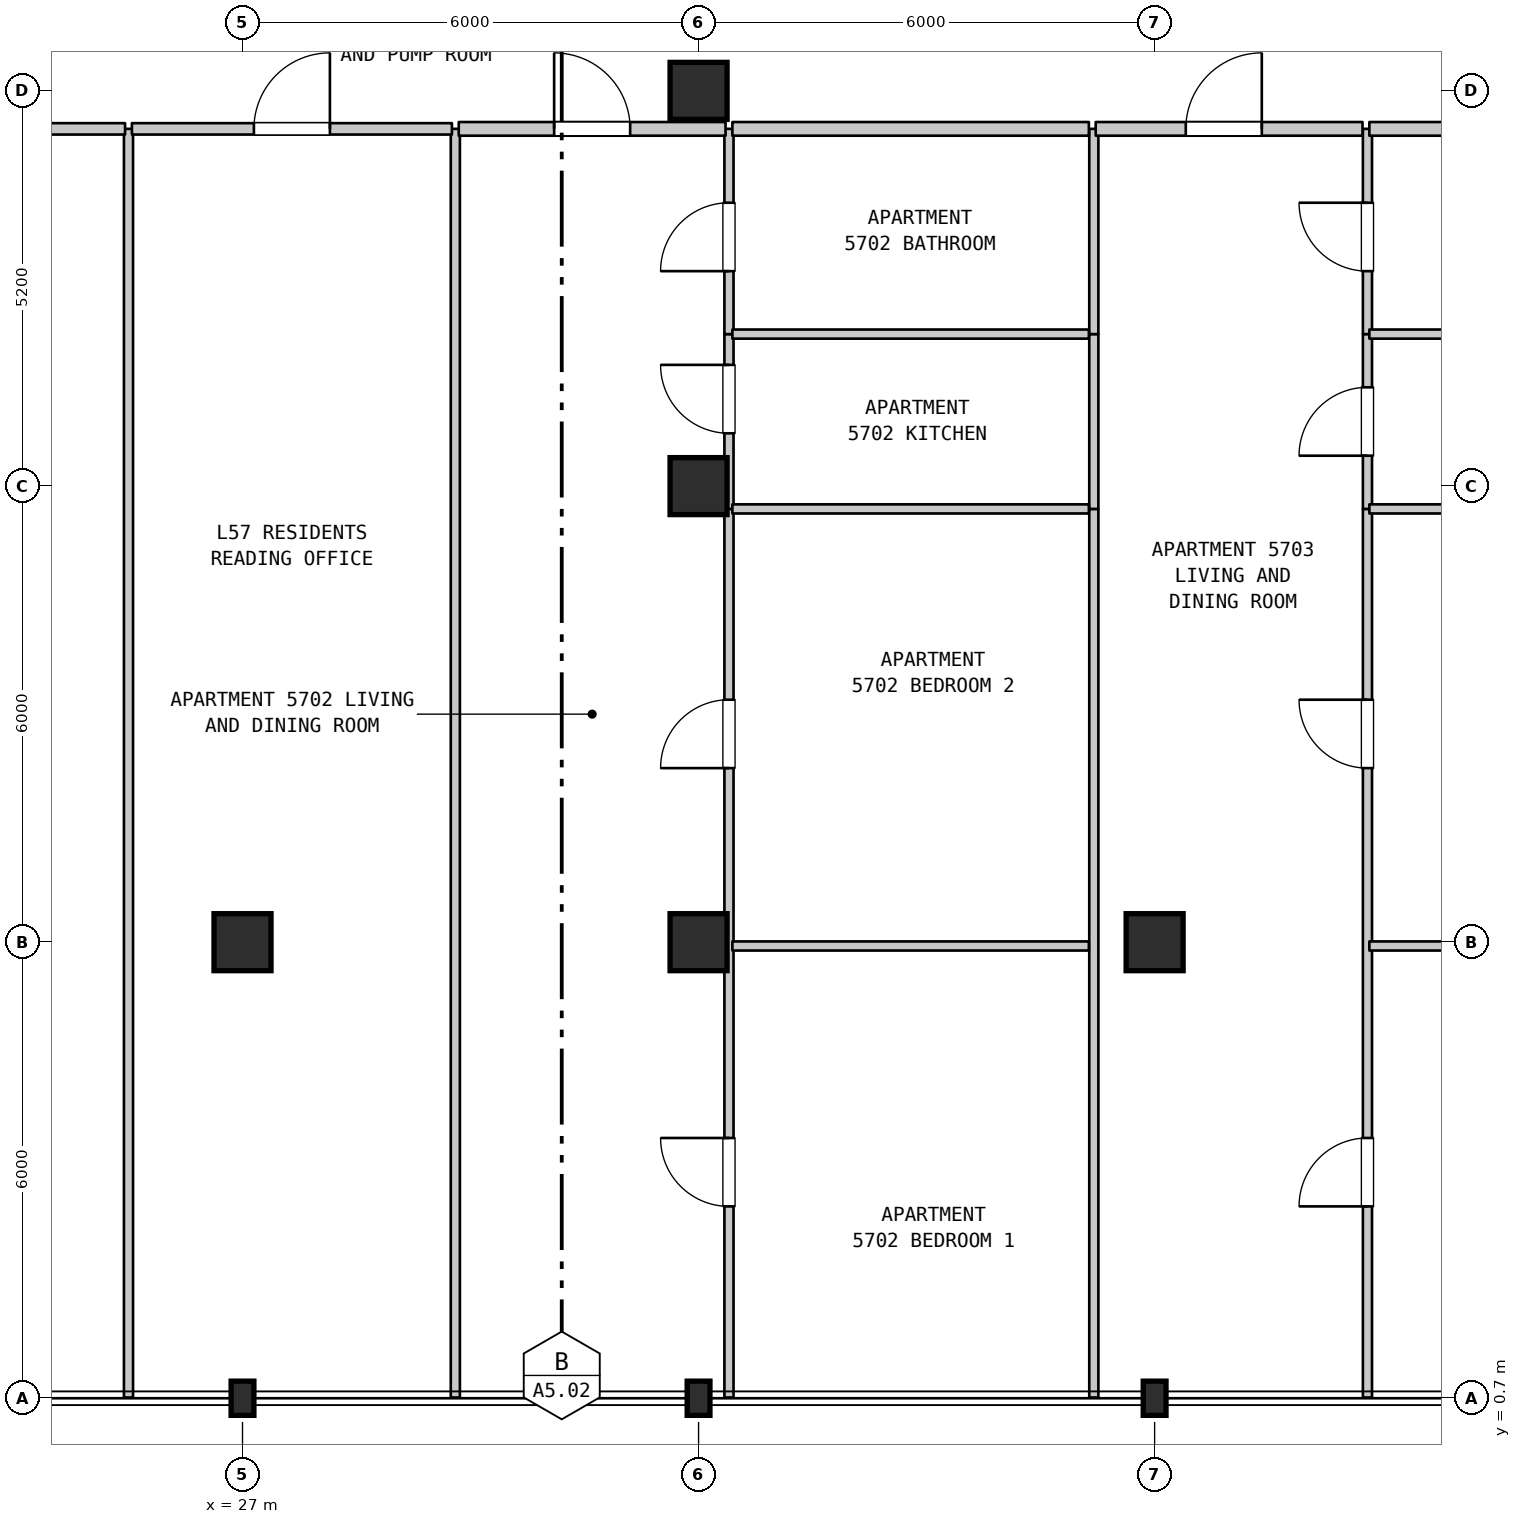
"""IFC4 building model, lengths in metres.
Left out: names, types, materials, properties, quantities, classifications, styles, units other than length and angle.
Written with IfcOpenShell. Run it as: python <this file> out.ifc"""

import sys

from ifc_helpers import new_model, si_unit, direction, frame, frame_2d, origin, origin_2d, place, context, subcontext, project, spatial, rectangle, i_section, extrude, element, fill, save


model = new_model("IFC4")
c1 = context("Model", 3, precision=1e-05, world=origin(), true_north=direction((0.0, 1.0)))
c2 = subcontext(c1, "Body", "Model", "MODEL_VIEW")
j1 = project(units=[si_unit("LENGTHUNIT", "METRE"), si_unit("PLANEANGLEUNIT", "RADIAN")], contexts=[c1])
p1 = place(None, origin())
s1 = spatial("IfcSite", under=j1, at=p1, CompositionType="ELEMENT")
p2 = place(p1, origin())
s2 = spatial("IfcBuilding", under=s1, at=p2, CompositionType="ELEMENT")
p3 = place(p2, frame((0.0, 0.0, 230.2)))
s3 = spatial("IfcBuildingStorey", under=s2, at=p3, CompositionType="ELEMENT", Elevation=230.2)
p4 = place(p3, frame((27.0, 0.7, 0.0), z_axis=(0.0, 0.0, 1.0), x_axis=(1.0, 0.0, 0.0)))
e1 = element("IfcColumn", 1, at=p4, inside=s3, PredefinedType="COLUMN", context=c2, shape_type="SweptSolid", body=[
    extrude(i_section(OverallWidth=0.3, OverallDepth=0.45, WebThickness=0.014, FlangeThickness=0.026, FilletRadius=0.027, at=origin_2d()), origin(), (0.0, 0.0, 1.0), 3.7),
])
p5 = place(p3, frame((27.0, 6.7, 0.0), z_axis=(0.0, 0.0, 1.0), x_axis=(1.0, 0.0, 0.0)))
e2 = element("IfcColumn", 2, at=p5, inside=s3, PredefinedType="COLUMN", context=c2, shape_type="SweptSolid", body=[
    extrude(rectangle(XDim=0.75, YDim=0.75, at=origin_2d()), origin(), (0.0, 0.0, 1.0), 3.7),
])
p6 = place(p3, frame((33.0, 0.7, 0.0), z_axis=(0.0, 0.0, 1.0), x_axis=(1.0, 0.0, 0.0)))
e3 = element("IfcColumn", 3, at=p6, inside=s3, PredefinedType="COLUMN", context=c2, shape_type="SweptSolid", body=[
    extrude(i_section(OverallWidth=0.3, OverallDepth=0.45, WebThickness=0.014, FlangeThickness=0.026, FilletRadius=0.027, at=origin_2d()), origin(), (0.0, 0.0, 1.0), 3.7),
])
for number, where, z_axis, x_axis in (
    (4, (33.0, 6.7, 0.0), (0.0, 0.0, 1.0), (1.0, 0.0, 0.0)),
    (5, (33.0, 12.7, 0.0), (0.0, 0.0, 1.0), (1.0, 0.0, 0.0)),
    (6, (33.0, 17.9, 0.0), (0.0, 0.0, 1.0), (1.0, 0.0, 0.0)),
):
    element("IfcColumn", number, at=place(p3, frame(where, z_axis=z_axis, x_axis=x_axis)), inside=s3, PredefinedType="COLUMN", context=c2, shape_type="SweptSolid", body=[
        extrude(rectangle(XDim=0.75, YDim=0.75, at=origin_2d()), origin(), (0.0, 0.0, 1.0), 3.7),
    ])
p7 = place(p3, frame((39.0, 0.7, 0.0), z_axis=(0.0, 0.0, 1.0), x_axis=(1.0, 0.0, 0.0)))
e7 = element("IfcColumn", 7, at=p7, inside=s3, PredefinedType="COLUMN", context=c2, shape_type="SweptSolid", body=[
    extrude(i_section(OverallWidth=0.3, OverallDepth=0.45, WebThickness=0.014, FlangeThickness=0.026, FilletRadius=0.027, at=origin_2d()), origin(), (0.0, 0.0, 1.0), 3.7),
])
p8 = place(p3, frame((39.0, 6.7, 0.0), z_axis=(0.0, 0.0, 1.0), x_axis=(1.0, 0.0, 0.0)))
e8 = element("IfcColumn", 8, at=p8, inside=s3, PredefinedType="COLUMN", context=c2, shape_type="SweptSolid", body=[
    extrude(rectangle(XDim=0.75, YDim=0.75, at=origin_2d()), origin(), (0.0, 0.0, 1.0), 3.7),
])
for number, where, z_axis, x_axis in (
    (9, (25.5, 0.71, 0.0), (0.0, 0.0, 1.0), (0.0, 1.0, 0.0)),
    (10, (29.8, 0.71, 0.0), (0.0, 0.0, 1.0), (0.0, 1.0, 0.0)),
):
    element("IfcWall", number, at=place(p3, frame(where, z_axis=z_axis, x_axis=x_axis)), inside=s3, PredefinedType="PARTITIONING", context=c2, shape_type="SweptSolid", body=[
        extrude(rectangle(XDim=16.69, YDim=0.12, at=frame_2d((8.345, 0.0))), origin(), (0.0, 0.0, 1.0), 3.39),
    ])
p9 = place(p3, frame((33.4, 0.71, 0.0), z_axis=(0.0, 0.0, 1.0), x_axis=(0.0, 1.0, 0.0)))
e11 = element("IfcWall", 11, at=p9, inside=s3, PredefinedType="PARTITIONING", context=c2, shape_type="SweptSolid", body=[
    extrude(rectangle(XDim=11.69, YDim=0.12, at=frame_2d((5.845, 0.0))), origin(), (0.0, 0.0, 1.0), 3.39),
])
p10 = place(p9, frame((2.514, 0.0, 0.0)))
e12 = element("IfcOpeningElement", 12, at=p10, cuts=e11, PredefinedType="OPENING", context=c2, shape_type="SweptSolid", body=[
    extrude(rectangle(XDim=0.9, YDim=2.15, at=frame_2d((0.45, 1.075))), frame((0.0, 0.07, 0.0), z_axis=(0.0, -1.0, 0.0), x_axis=(1.0, 0.0, 0.0)), (0.0, 0.0, 1.0), 0.14),
])
p11 = place(p9, frame((8.28, 0.0, 0.0)))
e13 = element("IfcOpeningElement", 13, at=p11, cuts=e11, PredefinedType="OPENING", context=c2, shape_type="SweptSolid", body=[
    extrude(rectangle(XDim=0.9, YDim=2.15, at=frame_2d((0.45, 1.075))), frame((0.0, 0.07, 0.0), z_axis=(0.0, -1.0, 0.0), x_axis=(1.0, 0.0, 0.0)), (0.0, 0.0, 1.0), 0.14),
])
p12 = place(p3, frame((33.4, 12.4, 0.0), z_axis=(0.0, 0.0, 1.0), x_axis=(0.0, 1.0, 0.0)))
e14 = element("IfcWall", 14, at=p12, inside=s3, PredefinedType="PARTITIONING", context=c2, shape_type="SweptSolid", body=[
    extrude(rectangle(XDim=2.3, YDim=0.12, at=frame_2d((1.15, 0.0))), origin(), (0.0, 0.0, 1.0), 3.39),
])
p13 = place(p12, frame((0.995, 0.0, 0.0)))
e15 = element("IfcOpeningElement", 15, at=p13, cuts=e14, PredefinedType="OPENING", context=c2, shape_type="SweptSolid", body=[
    extrude(rectangle(XDim=0.9, YDim=2.15, at=frame_2d((0.45, 1.075))), frame((0.0, 0.07, 0.0), z_axis=(0.0, -1.0, 0.0), x_axis=(1.0, 0.0, 0.0)), (0.0, 0.0, 1.0), 0.14),
])
p14 = place(p3, frame((33.4, 14.7, 0.0), z_axis=(0.0, 0.0, 1.0), x_axis=(0.0, 1.0, 0.0)))
e16 = element("IfcWall", 16, at=p14, inside=s3, PredefinedType="PARTITIONING", context=c2, shape_type="SweptSolid", body=[
    extrude(rectangle(XDim=2.7, YDim=0.12, at=frame_2d((1.35, 0.0))), origin(), (0.0, 0.0, 1.0), 3.39),
])
p15 = place(p14, frame((0.828, 0.0, 0.0)))
e17 = element("IfcOpeningElement", 17, at=p15, cuts=e16, PredefinedType="OPENING", context=c2, shape_type="SweptSolid", body=[
    extrude(rectangle(XDim=0.9, YDim=2.1, at=frame_2d((0.45, 1.05))), frame((0.0, 0.07, 0.0), z_axis=(0.0, -1.0, 0.0), x_axis=(1.0, 0.0, 0.0)), (0.0, 0.0, 1.0), 0.14),
])
p16 = place(p3, frame((38.2, 0.71, 0.0), z_axis=(0.0, 0.0, 1.0), x_axis=(0.0, 1.0, 0.0)))
e18 = element("IfcWall", 18, at=p16, inside=s3, PredefinedType="PARTITIONING", context=c2, shape_type="SweptSolid", body=[
    extrude(rectangle(XDim=11.69, YDim=0.12, at=frame_2d((5.845, 0.0))), origin(), (0.0, 0.0, 1.0), 3.39),
])
p17 = place(p3, frame((38.2, 12.4, 0.0), z_axis=(0.0, 0.0, 1.0), x_axis=(0.0, 1.0, 0.0)))
e19 = element("IfcWall", 19, at=p17, inside=s3, PredefinedType="PARTITIONING", context=c2, shape_type="SweptSolid", body=[
    extrude(rectangle(XDim=2.3, YDim=0.12, at=frame_2d((1.15, 0.0))), origin(), (0.0, 0.0, 1.0), 3.39),
])
p18 = place(p3, frame((38.2, 14.7, 0.0), z_axis=(0.0, 0.0, 1.0), x_axis=(0.0, 1.0, 0.0)))
e20 = element("IfcWall", 20, at=p18, inside=s3, PredefinedType="PARTITIONING", context=c2, shape_type="SweptSolid", body=[
    extrude(rectangle(XDim=2.7, YDim=0.12, at=frame_2d((1.35, 0.0))), origin(), (0.0, 0.0, 1.0), 3.39),
])
p19 = place(p3, frame((41.8, 0.71, 0.0), z_axis=(0.0, 0.0, 1.0), x_axis=(0.0, 1.0, 0.0)))
e21 = element("IfcWall", 21, at=p19, inside=s3, PredefinedType="PARTITIONING", context=c2, shape_type="SweptSolid", body=[
    extrude(rectangle(XDim=11.69, YDim=0.12, at=frame_2d((5.845, 0.0))), origin(), (0.0, 0.0, 1.0), 3.39),
])
p20 = place(p19, frame((2.514, 0.0, 0.0)))
e22 = element("IfcOpeningElement", 22, at=p20, cuts=e21, PredefinedType="OPENING", context=c2, shape_type="SweptSolid", body=[
    extrude(rectangle(XDim=0.9, YDim=2.15, at=frame_2d((0.45, 1.075))), frame((0.0, 0.07, 0.0), z_axis=(0.0, -1.0, 0.0), x_axis=(1.0, 0.0, 0.0)), (0.0, 0.0, 1.0), 0.14),
])
p21 = place(p19, frame((8.28, 0.0, 0.0)))
e23 = element("IfcOpeningElement", 23, at=p21, cuts=e21, PredefinedType="OPENING", context=c2, shape_type="SweptSolid", body=[
    extrude(rectangle(XDim=0.9, YDim=2.15, at=frame_2d((0.45, 1.075))), frame((0.0, 0.07, 0.0), z_axis=(0.0, -1.0, 0.0), x_axis=(1.0, 0.0, 0.0)), (0.0, 0.0, 1.0), 0.14),
])
p22 = place(p3, frame((41.8, 12.4, 0.0), z_axis=(0.0, 0.0, 1.0), x_axis=(0.0, 1.0, 0.0)))
e24 = element("IfcWall", 24, at=p22, inside=s3, PredefinedType="PARTITIONING", context=c2, shape_type="SweptSolid", body=[
    extrude(rectangle(XDim=2.3, YDim=0.12, at=frame_2d((1.15, 0.0))), origin(), (0.0, 0.0, 1.0), 3.39),
])
p23 = place(p22, frame((0.7, 0.0, 0.0)))
e25 = element("IfcOpeningElement", 25, at=p23, cuts=e24, PredefinedType="OPENING", context=c2, shape_type="SweptSolid", body=[
    extrude(rectangle(XDim=0.9, YDim=2.15, at=frame_2d((0.45, 1.075))), frame((0.0, 0.07, 0.0), z_axis=(0.0, -1.0, 0.0), x_axis=(1.0, 0.0, 0.0)), (0.0, 0.0, 1.0), 0.14),
])
p24 = place(p3, frame((41.8, 14.7, 0.0), z_axis=(0.0, 0.0, 1.0), x_axis=(0.0, 1.0, 0.0)))
e26 = element("IfcWall", 26, at=p24, inside=s3, PredefinedType="PARTITIONING", context=c2, shape_type="SweptSolid", body=[
    extrude(rectangle(XDim=2.7, YDim=0.12, at=frame_2d((1.35, 0.0))), origin(), (0.0, 0.0, 1.0), 3.39),
])
p25 = place(p24, frame((0.828, 0.0, 0.0)))
e27 = element("IfcOpeningElement", 27, at=p25, cuts=e26, PredefinedType="OPENING", context=c2, shape_type="SweptSolid", body=[
    extrude(rectangle(XDim=0.9, YDim=2.1, at=frame_2d((0.45, 1.05))), frame((0.0, 0.07, 0.0), z_axis=(0.0, -1.0, 0.0), x_axis=(1.0, 0.0, 0.0)), (0.0, 0.0, 1.0), 0.14),
])
p26 = place(p3, frame((33.445, 6.65, 0.0), z_axis=(0.0, 0.0, 1.0), x_axis=(1.0, 0.0, 0.0)))
e28 = element("IfcWall", 28, at=p26, inside=s3, PredefinedType="PARTITIONING", context=c2, shape_type="SweptSolid", body=[
    extrude(rectangle(XDim=4.69, YDim=0.12, at=frame_2d((2.345, 0.0))), origin(), (0.0, 0.0, 1.0), 3.09),
])
p27 = place(p3, frame((41.825, 6.65, 0.0), z_axis=(0.0, 0.0, 1.0), x_axis=(1.0, 0.0, 0.0)))
e29 = element("IfcWall", 29, at=p27, inside=s3, PredefinedType="PARTITIONING", context=c2, shape_type="SweptSolid", body=[
    extrude(rectangle(XDim=4.97, YDim=0.12, at=frame_2d((2.485, 0.0))), origin(), (0.0, 0.0, 1.0), 2.79),
])
p28 = place(p3, frame((33.445, 12.4, 0.0), z_axis=(0.0, 0.0, 1.0), x_axis=(1.0, 0.0, 0.0)))
e30 = element("IfcWall", 30, at=p28, inside=s3, PredefinedType="PARTITIONING", context=c2, shape_type="SweptSolid", body=[
    extrude(rectangle(XDim=4.69, YDim=0.12, at=frame_2d((2.345, 0.0))), origin(), (0.0, 0.0, 1.0), 3.39),
])
p29 = place(p3, frame((41.825, 12.4, 0.0), z_axis=(0.0, 0.0, 1.0), x_axis=(1.0, 0.0, 0.0)))
e31 = element("IfcWall", 31, at=p29, inside=s3, PredefinedType="PARTITIONING", context=c2, shape_type="SweptSolid", body=[
    extrude(rectangle(XDim=4.97, YDim=0.12, at=frame_2d((2.485, 0.0))), origin(), (0.0, 0.0, 1.0), 3.39),
])
p30 = place(p3, frame((33.445, 14.7, 0.0), z_axis=(0.0, 0.0, 1.0), x_axis=(1.0, 0.0, 0.0)))
e32 = element("IfcWall", 32, at=p30, inside=s3, PredefinedType="PARTITIONING", context=c2, shape_type="SweptSolid", body=[
    extrude(rectangle(XDim=4.69, YDim=0.12, at=frame_2d((2.345, 0.0))), origin(), (0.0, 0.0, 1.0), 3.39),
])
p31 = place(p3, frame((41.825, 14.7, 0.0), z_axis=(0.0, 0.0, 1.0), x_axis=(1.0, 0.0, 0.0)))
e33 = element("IfcWall", 33, at=p31, inside=s3, PredefinedType="PARTITIONING", context=c2, shape_type="SweptSolid", body=[
    extrude(rectangle(XDim=4.97, YDim=0.12, at=frame_2d((2.485, 0.0))), origin(), (0.0, 0.0, 1.0), 3.39),
])
p32 = place(p3, frame((20.545, 17.4, 0.0), z_axis=(0.0, 0.0, 1.0), x_axis=(1.0, 0.0, 0.0)))
e34 = element("IfcWall", 34, at=p32, inside=s3, PredefinedType="STANDARD", context=c2, shape_type="SweptSolid", body=[
    extrude(rectangle(XDim=4.91, YDim=0.15, at=frame_2d((2.455, 0.0))), origin(), (0.0, 0.0, 1.0), 3.39),
])
p33 = place(p32, frame((1.884, 0.0, 0.0)))
e35 = element("IfcOpeningElement", 35, at=p33, cuts=e34, PredefinedType="OPENING", context=c2, shape_type="SweptSolid", body=[
    extrude(rectangle(XDim=1.0, YDim=2.15, at=frame_2d((0.5, 1.075))), frame((0.0, 0.085, 0.0), z_axis=(0.0, -1.0, 0.0), x_axis=(1.0, 0.0, 0.0)), (0.0, 0.0, 1.0), 0.17),
])
p34 = place(p3, frame((25.545, 17.4, 0.0), z_axis=(0.0, 0.0, 1.0), x_axis=(1.0, 0.0, 0.0)))
e36 = element("IfcWall", 36, at=p34, inside=s3, PredefinedType="STANDARD", context=c2, shape_type="SweptSolid", body=[
    extrude(rectangle(XDim=4.21, YDim=0.15, at=frame_2d((2.105, 0.0))), origin(), (0.0, 0.0, 1.0), 3.39),
])
p35 = place(p34, frame((1.605, 0.0, 0.0)))
e37 = element("IfcOpeningElement", 37, at=p35, cuts=e36, PredefinedType="OPENING", context=c2, shape_type="SweptSolid", body=[
    extrude(rectangle(XDim=1.0, YDim=2.15, at=frame_2d((0.5, 1.075))), frame((0.0, 0.085, 0.0), z_axis=(0.0, -1.0, 0.0), x_axis=(1.0, 0.0, 0.0)), (0.0, 0.0, 1.0), 0.17),
])
p36 = place(p3, frame((29.845, 17.4, 0.0), z_axis=(0.0, 0.0, 1.0), x_axis=(1.0, 0.0, 0.0)))
e38 = element("IfcWall", 38, at=p36, inside=s3, PredefinedType="STANDARD", context=c2, shape_type="SweptSolid", body=[
    extrude(rectangle(XDim=3.51, YDim=0.18, at=frame_2d((1.755, 0.0))), origin(), (0.0, 0.0, 1.0), 3.39),
])
p37 = place(p36, frame((1.255, 0.0, 0.0)))
e39 = element("IfcOpeningElement", 39, at=p37, cuts=e38, PredefinedType="OPENING", context=c2, shape_type="SweptSolid", body=[
    extrude(rectangle(XDim=1.0, YDim=2.15, at=frame_2d((0.5, 1.075))), frame((0.0, 0.1, 0.0), z_axis=(0.0, -1.0, 0.0), x_axis=(1.0, 0.0, 0.0)), (0.0, 0.0, 1.0), 0.2),
])
p38 = place(p3, frame((33.445, 17.4, 0.0), z_axis=(0.0, 0.0, 1.0), x_axis=(1.0, 0.0, 0.0)))
e40 = element("IfcWall", 40, at=p38, inside=s3, PredefinedType="STANDARD", context=c2, shape_type="SweptSolid", body=[
    extrude(rectangle(XDim=4.69, YDim=0.18, at=frame_2d((2.345, 0.0))), origin(), (0.0, 0.0, 1.0), 3.39),
])
p39 = place(p3, frame((38.225, 17.4, 0.0), z_axis=(0.0, 0.0, 1.0), x_axis=(1.0, 0.0, 0.0)))
e41 = element("IfcWall", 41, at=p39, inside=s3, PredefinedType="STANDARD", context=c2, shape_type="SweptSolid", body=[
    extrude(rectangle(XDim=3.51, YDim=0.18, at=frame_2d((1.755, 0.0))), origin(), (0.0, 0.0, 1.0), 3.39),
])
p40 = place(p39, frame((1.185, 0.0, 0.0)))
e42 = element("IfcOpeningElement", 42, at=p40, cuts=e41, PredefinedType="OPENING", context=c2, shape_type="SweptSolid", body=[
    extrude(rectangle(XDim=1.0, YDim=2.15, at=frame_2d((0.5, 1.075))), frame((0.0, 0.1, 0.0), z_axis=(0.0, -1.0, 0.0), x_axis=(1.0, 0.0, 0.0)), (0.0, 0.0, 1.0), 0.2),
])
p41 = place(p3, frame((41.825, 17.4, 0.0), z_axis=(0.0, 0.0, 1.0), x_axis=(1.0, 0.0, 0.0)))
e43 = element("IfcWall", 43, at=p41, inside=s3, PredefinedType="STANDARD", context=c2, shape_type="SweptSolid", body=[
    extrude(rectangle(XDim=4.97, YDim=0.18, at=frame_2d((2.485, 0.0))), origin(), (0.0, 0.0, 1.0), 3.39),
])
p42 = place(p10, origin())
e44 = element("IfcDoor", 44, at=p42, inside=s3, OperationType="SINGLE_SWING_RIGHT", PredefinedType="DOOR", context=c2, shape_type="SweptSolid", body=[
    extrude(rectangle(XDim=0.9, YDim=2.15, at=frame_2d((0.45, 1.075))), frame((0.0, 0.025, 0.0), z_axis=(0.0, -1.0, 0.0), x_axis=(1.0, 0.0, 0.0)), (0.0, 0.0, 1.0), 0.05),
])
fill(e12, e44)
p43 = place(p11, origin())
e45 = element("IfcDoor", 45, at=p43, inside=s3, OperationType="SINGLE_SWING_LEFT", PredefinedType="DOOR", context=c2, shape_type="SweptSolid", body=[
    extrude(rectangle(XDim=0.9, YDim=2.15, at=frame_2d((0.45, 1.075))), frame((0.0, 0.025, 0.0), z_axis=(0.0, -1.0, 0.0), x_axis=(1.0, 0.0, 0.0)), (0.0, 0.0, 1.0), 0.05),
])
fill(e13, e45)
p44 = place(p13, origin())
e46 = element("IfcDoor", 46, at=p44, inside=s3, OperationType="SINGLE_SWING_RIGHT", PredefinedType="DOOR", context=c2, shape_type="SweptSolid", body=[
    extrude(rectangle(XDim=0.9, YDim=2.15, at=frame_2d((0.45, 1.075))), frame((0.0, 0.025, 0.0), z_axis=(0.0, -1.0, 0.0), x_axis=(1.0, 0.0, 0.0)), (0.0, 0.0, 1.0), 0.05),
])
fill(e15, e46)
p45 = place(p15, origin())
e47 = element("IfcDoor", 47, at=p45, inside=s3, OperationType="SINGLE_SWING_LEFT", PredefinedType="DOOR", context=c2, shape_type="SweptSolid", body=[
    extrude(rectangle(XDim=0.9, YDim=2.1, at=frame_2d((0.45, 1.05))), frame((0.0, 0.025, 0.0), z_axis=(0.0, -1.0, 0.0), x_axis=(1.0, 0.0, 0.0)), (0.0, 0.0, 1.0), 0.05),
])
fill(e17, e47)
p46 = place(p20, origin())
e48 = element("IfcDoor", 48, at=p46, inside=s3, OperationType="SINGLE_SWING_LEFT", PredefinedType="DOOR", context=c2, shape_type="SweptSolid", body=[
    extrude(rectangle(XDim=0.9, YDim=2.15, at=frame_2d((0.45, 1.075))), frame((0.0, 0.025, 0.0), z_axis=(0.0, -1.0, 0.0), x_axis=(1.0, 0.0, 0.0)), (0.0, 0.0, 1.0), 0.05),
])
fill(e22, e48)
p47 = place(p21, origin())
e49 = element("IfcDoor", 49, at=p47, inside=s3, OperationType="SINGLE_SWING_RIGHT", PredefinedType="DOOR", context=c2, shape_type="SweptSolid", body=[
    extrude(rectangle(XDim=0.9, YDim=2.15, at=frame_2d((0.45, 1.075))), frame((0.0, 0.025, 0.0), z_axis=(0.0, -1.0, 0.0), x_axis=(1.0, 0.0, 0.0)), (0.0, 0.0, 1.0), 0.05),
])
fill(e23, e49)
p48 = place(p23, origin())
e50 = element("IfcDoor", 50, at=p48, inside=s3, OperationType="SINGLE_SWING_LEFT", PredefinedType="DOOR", context=c2, shape_type="SweptSolid", body=[
    extrude(rectangle(XDim=0.9, YDim=2.15, at=frame_2d((0.45, 1.075))), frame((0.0, 0.025, 0.0), z_axis=(0.0, -1.0, 0.0), x_axis=(1.0, 0.0, 0.0)), (0.0, 0.0, 1.0), 0.05),
])
fill(e25, e50)
p49 = place(p25, origin())
e51 = element("IfcDoor", 51, at=p49, inside=s3, OperationType="SINGLE_SWING_RIGHT", PredefinedType="DOOR", context=c2, shape_type="SweptSolid", body=[
    extrude(rectangle(XDim=0.9, YDim=2.1, at=frame_2d((0.45, 1.05))), frame((0.0, 0.025, 0.0), z_axis=(0.0, -1.0, 0.0), x_axis=(1.0, 0.0, 0.0)), (0.0, 0.0, 1.0), 0.05),
])
fill(e27, e51)
p50 = place(p35, origin())
e52 = element("IfcDoor", 52, at=p50, inside=s3, OperationType="SINGLE_SWING_RIGHT", PredefinedType="DOOR", context=c2, shape_type="SweptSolid", body=[
    extrude(rectangle(XDim=1.0, YDim=2.15, at=frame_2d((0.5, 1.075))), frame((0.0, 0.025, 0.0), z_axis=(0.0, -1.0, 0.0), x_axis=(1.0, 0.0, 0.0)), (0.0, 0.0, 1.0), 0.05),
])
fill(e37, e52)
p51 = place(p37, origin())
e53 = element("IfcDoor", 53, at=p51, inside=s3, OperationType="SINGLE_SWING_LEFT", PredefinedType="DOOR", context=c2, shape_type="SweptSolid", body=[
    extrude(rectangle(XDim=1.0, YDim=2.15, at=frame_2d((0.5, 1.075))), frame((0.0, 0.025, 0.0), z_axis=(0.0, -1.0, 0.0), x_axis=(1.0, 0.0, 0.0)), (0.0, 0.0, 1.0), 0.05),
])
fill(e39, e53)
p52 = place(p40, origin())
e54 = element("IfcDoor", 54, at=p52, inside=s3, OperationType="SINGLE_SWING_RIGHT", PredefinedType="DOOR", context=c2, shape_type="SweptSolid", body=[
    extrude(rectangle(XDim=1.0, YDim=2.15, at=frame_2d((0.5, 1.075))), frame((0.0, 0.025, 0.0), z_axis=(0.0, -1.0, 0.0), x_axis=(1.0, 0.0, 0.0)), (0.0, 0.0, 1.0), 0.05),
])
fill(e42, e54)
save(model, sys.argv[1])
